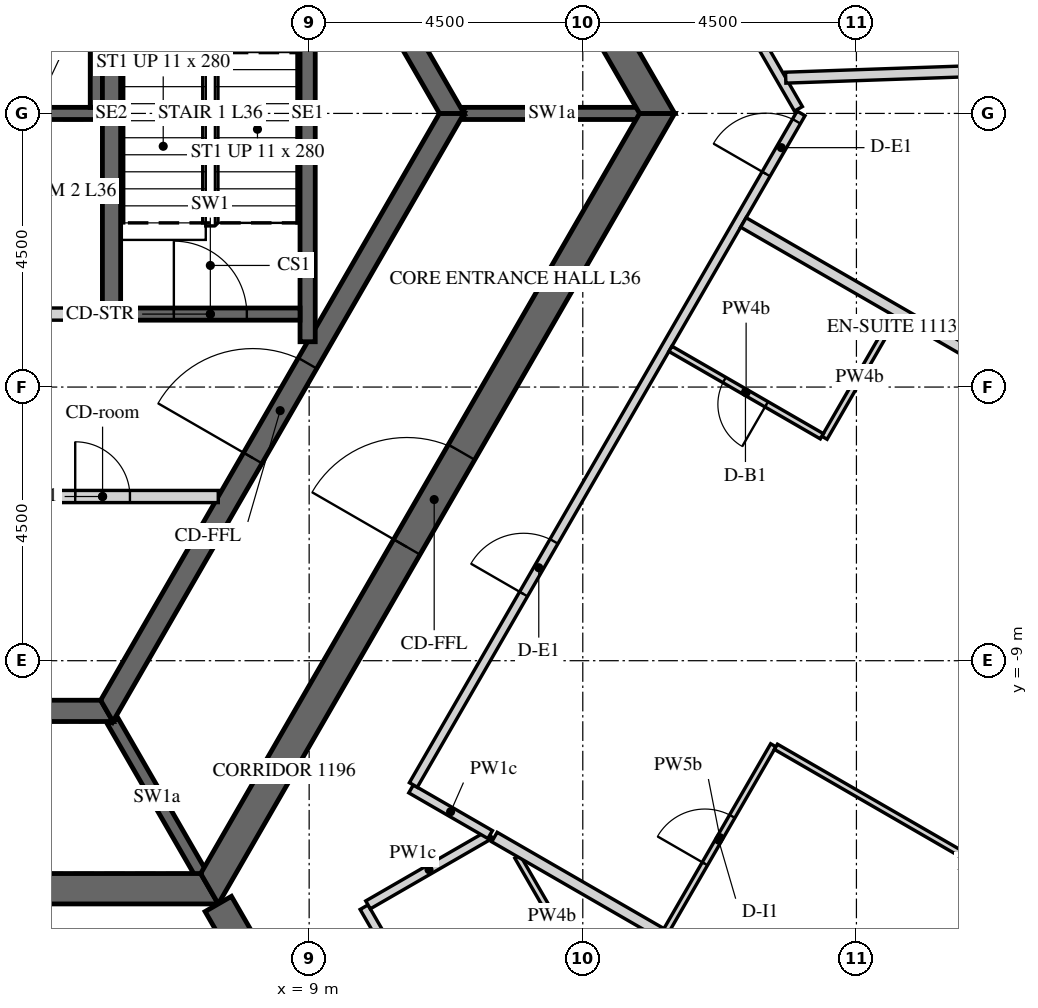
"""IFC4 building model, lengths in metres.
Left out: names, types, materials, properties, quantities, classifications, styles, units other than length and angle.
Written with IfcOpenShell. Run it as: python <this file> out.ifc"""

import sys

from ifc_helpers import new_model, si_unit, direction, frame, frame_2d, origin, place, context, subcontext, project, spatial, polyline, rectangle, outline, extrude, element, fill, save


model = new_model("IFC4")
c1 = context("Model", 3, precision=1e-05, world=origin(), true_north=direction((0.0, 1.0)))
c2 = subcontext(c1, "Body", "Model", "MODEL_VIEW")
j1 = project(units=[si_unit("LENGTHUNIT", "METRE"), si_unit("PLANEANGLEUNIT", "RADIAN")], contexts=[c1])
p1 = place(None, origin())
s1 = spatial("IfcSite", under=j1, at=p1, CompositionType="ELEMENT")
p2 = place(p1, origin())
s2 = spatial("IfcBuilding", under=s1, at=p2, CompositionType="ELEMENT")
p3 = place(p2, frame((0.0, 0.0, 156.6)))
s3 = spatial("IfcBuildingStorey", under=s2, at=p3, CompositionType="ELEMENT", Elevation=156.6)
p4 = place(p3, frame((17.63, -24.914, -0.15), z_axis=(0.0, 0.0, 1.0), x_axis=(0.499998569178, 0.866026229868, 0.0)))
e1 = element("IfcWall", 1, at=p4, inside=s3, PredefinedType="SOLIDWALL", context=c2, shape_type="SweptSolid", body=[
    extrude(outline(polyline([(-0.022, -0.275), (27.783, -0.275), (27.732, 0.275), (0.022, 0.275), (-0.022, -0.275)])), origin(), (0.0, 0.0, 1.0), 3.9),
])
p5 = place(p4, frame((1.879, 0.0, 1.05)))
e2 = element("IfcOpeningElement", 2, at=p5, cuts=e1, PredefinedType="OPENING", context=c2, shape_type="SweptSolid", body=[
    extrude(rectangle(XDim=2.4, YDim=2.4, at=frame_2d((1.2, 1.2))), frame((0.0, 0.285, 0.0), z_axis=(0.0, -1.0, 0.0), x_axis=(1.0, 0.0, 0.0)), (0.0, 0.0, 1.0), 0.57),
])
p6 = place(p4, frame((5.479, 0.0, 1.05)))
e3 = element("IfcOpeningElement", 3, at=p6, cuts=e1, PredefinedType="OPENING", context=c2, shape_type="SweptSolid", body=[
    extrude(rectangle(XDim=2.4, YDim=2.4, at=frame_2d((1.2, 1.2))), frame((0.0, 0.285, 0.0), z_axis=(0.0, -1.0, 0.0), x_axis=(1.0, 0.0, 0.0)), (0.0, 0.0, 1.0), 0.57),
])
p7 = place(p4, frame((9.079, 0.0, 1.05)))
e4 = element("IfcOpeningElement", 4, at=p7, cuts=e1, PredefinedType="OPENING", context=c2, shape_type="SweptSolid", body=[
    extrude(rectangle(XDim=2.4, YDim=2.4, at=frame_2d((1.2, 1.2))), frame((0.0, 0.285, 0.0), z_axis=(0.0, -1.0, 0.0), x_axis=(1.0, 0.0, 0.0)), (0.0, 0.0, 1.0), 0.57),
])
p8 = place(p4, frame((12.679, 0.0, 1.05)))
e5 = element("IfcOpeningElement", 5, at=p8, cuts=e1, PredefinedType="OPENING", context=c2, shape_type="SweptSolid", body=[
    extrude(rectangle(XDim=2.4, YDim=2.4, at=frame_2d((1.2, 1.2))), frame((0.0, 0.285, 0.0), z_axis=(0.0, -1.0, 0.0), x_axis=(1.0, 0.0, 0.0)), (0.0, 0.0, 1.0), 0.57),
])
p9 = place(p4, frame((16.279, 0.0, 1.05)))
e6 = element("IfcOpeningElement", 6, at=p9, cuts=e1, PredefinedType="OPENING", context=c2, shape_type="SweptSolid", body=[
    extrude(rectangle(XDim=2.4, YDim=2.4, at=frame_2d((1.2, 1.2))), frame((0.0, 0.285, 0.0), z_axis=(0.0, -1.0, 0.0), x_axis=(1.0, 0.0, 0.0)), (0.0, 0.0, 1.0), 0.57),
])
p10 = place(p4, frame((19.879, 0.0, 1.05)))
e7 = element("IfcOpeningElement", 7, at=p10, cuts=e1, PredefinedType="OPENING", context=c2, shape_type="SweptSolid", body=[
    extrude(rectangle(XDim=2.4, YDim=2.4, at=frame_2d((1.2, 1.2))), frame((0.0, 0.285, 0.0), z_axis=(0.0, -1.0, 0.0), x_axis=(1.0, 0.0, 0.0)), (0.0, 0.0, 1.0), 0.57),
])
p11 = place(p4, frame((23.479, 0.0, 1.05)))
e8 = element("IfcOpeningElement", 8, at=p11, cuts=e1, PredefinedType="OPENING", context=c2, shape_type="SweptSolid", body=[
    extrude(rectangle(XDim=2.4, YDim=2.4, at=frame_2d((1.2, 1.2))), frame((0.0, 0.285, 0.0), z_axis=(0.0, -1.0, 0.0), x_axis=(1.0, 0.0, 0.0)), (0.0, 0.0, 1.0), 0.57),
])
p12 = place(p3, frame((-7.361, -12.75, -0.15), z_axis=(0.0, 0.0, 1.0), x_axis=(1.0, 0.0, 0.0)))
e9 = element("IfcWall", 9, at=p12, inside=s3, PredefinedType="SHEAR", context=c2, shape_type="SweptSolid", body=[
    extrude(outline(polyline([(-0.144, -0.25), (14.866, -0.25), (14.578, 0.25), (0.144, 0.25), (-0.144, -0.25)])), origin(), (0.0, 0.0, 1.0), 3.9),
])
p13 = place(p12, frame((6.761, 0.0, 0.15)))
e10 = element("IfcOpeningElement", 10, at=p13, cuts=e9, PredefinedType="OPENING", context=c2, shape_type="SweptSolid", body=[
    extrude(rectangle(XDim=1.2, YDim=2.4, at=frame_2d((0.6, 1.2))), frame((0.0, 0.26, 0.0), z_axis=(0.0, -1.0, 0.0), x_axis=(1.0, 0.0, 0.0)), (0.0, 0.0, 1.0), 0.52),
])
p14 = place(p3, frame((7.361, -12.75, -0.15), z_axis=(0.0, 0.0, 1.0), x_axis=(0.50000571537, 0.866022103989, 0.0)))
e11 = element("IfcWall", 11, at=p14, inside=s3, PredefinedType="SHEAR", context=c2, shape_type="SweptSolid", body=[
    extrude(outline(polyline([(-0.144, -0.25), (14.867, -0.25), (14.578, 0.25), (0.144, 0.25), (-0.144, -0.25)])), origin(), (0.0, 0.0, 1.0), 3.9),
])
p15 = place(p14, frame((6.49, 0.0, 0.15)))
e12 = element("IfcOpeningElement", 12, at=p15, cuts=e11, PredefinedType="OPENING", context=c2, shape_type="SweptSolid", body=[
    extrude(rectangle(XDim=1.8, YDim=2.4, at=frame_2d((0.9, 1.2))), frame((0.0, 0.26, 0.0), z_axis=(0.0, -1.0, 0.0), x_axis=(1.0, 0.0, 0.0)), (0.0, 0.0, 1.0), 0.52),
])
p16 = place(p3, frame((14.722, 0.0, -0.15), z_axis=(0.0, 0.0, 1.0), x_axis=(-0.50000571537, 0.866022103989, 0.0)))
e13 = element("IfcWall", 13, at=p16, inside=s3, PredefinedType="SHEAR", context=c2, shape_type="SweptSolid", body=[
    extrude(outline(polyline([(-0.144, -0.25), (14.867, -0.25), (14.578, 0.25), (0.144, 0.25), (-0.144, -0.25)])), origin(), (0.0, 0.0, 1.0), 3.9),
])
p17 = place(p16, frame((6.432, 0.0, 0.15)))
e14 = element("IfcOpeningElement", 14, at=p17, cuts=e13, PredefinedType="OPENING", context=c2, shape_type="SweptSolid", body=[
    extrude(rectangle(XDim=1.8, YDim=2.4, at=frame_2d((0.9, 1.2))), frame((0.0, 0.26, 0.0), z_axis=(0.0, -1.0, 0.0), x_axis=(1.0, 0.0, 0.0)), (0.0, 0.0, 1.0), 0.52),
])
p18 = place(p3, frame((7.506, -13.0, -0.15), z_axis=(0.0, 0.0, 1.0), x_axis=(0.499988271576, -0.866032175087, 0.0)))
e15 = element("IfcWall", 15, at=p18, inside=s3, PredefinedType="SHEAR", context=c2, shape_type="SweptSolid", body=[
    extrude(rectangle(XDim=15.424, YDim=0.5, at=frame_2d((7.712, 0.0))), origin(), (0.0, 0.0, 1.0), 3.9),
])
p19 = place(p18, frame((6.812, 0.0, 0.15)))
e16 = element("IfcOpeningElement", 16, at=p19, cuts=e15, PredefinedType="OPENING", context=c2, shape_type="SweptSolid", body=[
    extrude(rectangle(XDim=1.8, YDim=2.4, at=frame_2d((0.9, 1.2))), frame((0.0, 0.26, 0.0), z_axis=(0.0, -1.0, 0.0), x_axis=(1.0, 0.0, 0.0)), (0.0, 0.0, 1.0), 0.52),
])
p20 = place(p3, frame((-5.673, -9.825, -0.15), z_axis=(0.0, 0.0, 1.0), x_axis=(1.0, 0.0, 0.0)))
e17 = element("IfcWall", 17, at=p20, inside=s3, PredefinedType="SHEAR", context=c2, shape_type="SweptSolid", body=[
    extrude(outline(polyline([(-0.101, -0.175), (11.446, -0.175), (11.244, 0.175), (0.101, 0.175), (-0.101, -0.175)])), origin(), (0.0, 0.0, 1.0), 3.9),
])
p21 = place(p3, frame((5.673, -9.825, -0.15), z_axis=(0.0, 0.0, 1.0), x_axis=(0.499995046907, 0.866028263435, 0.0)))
e18 = element("IfcWall", 18, at=p21, inside=s3, PredefinedType="SHEAR", context=c2, shape_type="SweptSolid", body=[
    extrude(outline(polyline([(-0.101, -0.175), (11.446, -0.175), (11.244, 0.175), (0.101, 0.175), (-0.101, -0.175)])), origin(), (0.0, 0.0, 1.0), 3.9),
])
p22 = place(p21, frame((4.801, 0.0, 0.15)))
e19 = element("IfcOpeningElement", 19, at=p22, cuts=e18, PredefinedType="OPENING", context=c2, shape_type="SweptSolid", body=[
    extrude(rectangle(XDim=1.8, YDim=2.4, at=frame_2d((0.9, 1.2))), frame((0.0, 0.185, 0.0), z_axis=(0.0, -1.0, 0.0), x_axis=(1.0, 0.0, 0.0)), (0.0, 0.0, 1.0), 0.37),
])
p23 = place(p3, frame((11.345, 0.0, -0.15), z_axis=(0.0, 0.0, 1.0), x_axis=(-0.499995046907, 0.866028263435, 0.0)))
e20 = element("IfcWall", 20, at=p23, inside=s3, PredefinedType="SHEAR", context=c2, shape_type="SweptSolid", body=[
    extrude(outline(polyline([(-0.101, -0.175), (11.446, -0.175), (11.244, 0.175), (0.101, 0.175), (-0.101, -0.175)])), origin(), (0.0, 0.0, 1.0), 3.9),
])
p24 = place(p23, frame((4.744, 0.0, 0.15)))
e21 = element("IfcOpeningElement", 21, at=p24, cuts=e20, PredefinedType="OPENING", context=c2, shape_type="SweptSolid", body=[
    extrude(rectangle(XDim=1.8, YDim=2.4, at=frame_2d((0.9, 1.2))), frame((0.0, 0.185, 0.0), z_axis=(0.0, -1.0, 0.0), x_axis=(1.0, 0.0, 0.0)), (0.0, 0.0, 1.0), 0.37),
])
p25 = place(p3, frame((-5.6, 0.0, -0.25), z_axis=(0.0, 0.0, 1.0), x_axis=(1.0, 0.0, 0.0)))
e22 = element("IfcWall", 22, at=p25, inside=s3, PredefinedType="SHEAR", context=c2, shape_type="SweptSolid", body=[
    extrude(rectangle(XDim=11.2, YDim=0.2, at=frame_2d((5.6, 0.0))), origin(), (0.0, 0.0, 1.0), 3.9),
])
p26 = place(p3, frame((5.5, 0.1, -0.25), z_axis=(0.0, 0.0, 1.0), x_axis=(0.0, 1.0, 0.0)))
e23 = element("IfcWall", 23, at=p26, inside=s3, PredefinedType="SHEAR", context=c2, shape_type="SweptSolid", body=[
    extrude(rectangle(XDim=3.1, YDim=0.2, at=frame_2d((1.55, 0.0))), origin(), (0.0, 0.0, 1.0), 3.9),
])
p27 = place(p3, frame((0.1, -3.3, 0.0), z_axis=(0.0, 0.0, 1.0), x_axis=(1.0, 0.0, 0.0)))
e24 = element("IfcWall", 24, at=p27, inside=s3, PredefinedType="PARTITIONING", context=c2, shape_type="SweptSolid", body=[
    extrude(rectangle(XDim=5.5, YDim=0.2, at=frame_2d((2.75, 0.0))), origin(), (0.0, 0.0, 1.0), 3.65),
])
p28 = place(p27, frame((2.3, 0.0, 0.0)))
e25 = element("IfcOpeningElement", 25, at=p28, cuts=e24, PredefinedType="OPENING", context=c2, shape_type="SweptSolid", body=[
    extrude(rectangle(XDim=0.9, YDim=2.1, at=frame_2d((0.45, 1.05))), frame((0.0, 0.11, 0.0), z_axis=(0.0, -1.0, 0.0), x_axis=(1.0, 0.0, 0.0)), (0.0, 0.0, 1.0), 0.22),
])
p29 = place(p3, frame((3.7, -6.3, 0.0), z_axis=(0.0, 0.0, 1.0), x_axis=(1.0, 0.0, 0.0)))
e26 = element("IfcWall", 26, at=p29, inside=s3, PredefinedType="PARTITIONING", context=c2, shape_type="SweptSolid", body=[
    extrude(rectangle(XDim=3.806, YDim=0.2, at=frame_2d((1.903, 0.0))), origin(), (0.0, 0.0, 1.0), 3.65),
])
p30 = place(p29, frame((1.453, 0.0, 0.0)))
e27 = element("IfcOpeningElement", 27, at=p30, cuts=e26, PredefinedType="OPENING", context=c2, shape_type="SweptSolid", body=[
    extrude(rectangle(XDim=0.9, YDim=2.1, at=frame_2d((0.45, 1.05))), frame((0.0, 0.11, 0.0), z_axis=(0.0, -1.0, 0.0), x_axis=(1.0, 0.0, 0.0)), (0.0, 0.0, 1.0), 0.22),
])
for number, where, z_axis, x_axis in (
    (28, (11.547, 0.0, -0.15), (0.0, 0.0, 1.0), (1.0, 0.0, 0.0)),
    (29, (5.773, -10.0, -0.15), (0.0, 0.0, 1.0), (0.5, -0.866, 0.0)),
):
    element("IfcWall", number, at=place(p3, frame(where, z_axis=z_axis, x_axis=x_axis)), inside=s3, PredefinedType="SHEAR", context=c2, shape_type="SweptSolid", body=[
        extrude(rectangle(XDim=2.887, YDim=0.2, at=frame_2d((1.443, 0.0))), origin(), (0.0, 0.0, 1.0), 3.9),
    ])
p31 = place(p3, frame((5.75, -3.4, -0.25), z_axis=(0.0, 0.0, 1.0), x_axis=(0.0, 1.0, 0.0)))
e30 = element("IfcWall", 30, at=p31, inside=s3, PredefinedType="SHEAR", context=c2, shape_type="SweptSolid", body=[
    extrude(rectangle(XDim=6.8, YDim=0.3, at=frame_2d((3.4, 0.0))), origin(), (0.0, 0.0, 1.0), 3.9),
])
p32 = place(p3, frame((8.975, -3.755, -0.25), z_axis=(0.0, 0.0, 1.0), x_axis=(0.0, 1.0, 0.0)))
e31 = element("IfcWall", 31, at=p32, inside=s3, PredefinedType="SHEAR", context=c2, shape_type="SweptSolid", body=[
    extrude(rectangle(XDim=7.51, YDim=0.25, at=frame_2d((3.755, 0.0))), origin(), (0.0, 0.0, 1.0), 3.9),
])
p33 = place(p3, frame((5.9, -3.3, -0.25), z_axis=(0.0, 0.0, 1.0), x_axis=(1.0, 0.0, 0.0)))
e32 = element("IfcWall", 32, at=p33, inside=s3, PredefinedType="SHEAR", context=c2, shape_type="SweptSolid", body=[
    extrude(rectangle(XDim=2.95, YDim=0.2, at=frame_2d((1.475, 0.0))), origin(), (0.0, 0.0, 1.0), 3.9),
])
p34 = place(p33, frame((0.875, 0.0, 0.25)))
e33 = element("IfcOpeningElement", 33, at=p34, cuts=e32, PredefinedType="OPENING", context=c2, shape_type="SweptSolid", body=[
    extrude(rectangle(XDim=1.2, YDim=2.4, at=frame_2d((0.6, 1.2))), frame((0.0, 0.11, 0.0), z_axis=(0.0, -1.0, 0.0), x_axis=(1.0, 0.0, 0.0)), (0.0, 0.0, 1.0), 0.22),
])
p35 = place(p3, frame((13.699, -19.628, 0.0), z_axis=(0.0, 0.0, 1.0), x_axis=(-0.499998968938, 0.866025999068, 0.0)))
e34 = element("IfcWall", 34, at=p35, inside=s3, PredefinedType="PARTITIONING", context=c2, shape_type="SweptSolid", body=[
    extrude(rectangle(XDim=7.592, YDim=0.15, at=frame_2d((3.796, 0.0))), origin(), (0.0, 0.0, 1.0), 2.823),
])
p36 = place(p35, frame((2.033, 0.0, 0.0)))
e35 = element("IfcOpeningElement", 35, at=p36, cuts=e34, PredefinedType="OPENING", context=c2, shape_type="SweptSolid", body=[
    extrude(rectangle(XDim=1.0, YDim=2.1, at=frame_2d((0.5, 1.05))), frame((0.0, 0.085, 0.0), z_axis=(0.0, -1.0, 0.0), x_axis=(1.0, 0.0, 0.0)), (0.0, 0.0, 1.0), 0.17),
])
p37 = place(p3, frame((9.968, -13.016, 0.0), z_axis=(0.0, 0.0, 1.0), x_axis=(0.866022320763, 0.500005339912, 0.0)))
e36 = element("IfcWall", 36, at=p37, inside=s3, PredefinedType="PARTITIONING", context=c2, shape_type="SweptSolid", body=[
    extrude(rectangle(XDim=2.316, YDim=0.15, at=frame_2d((1.158, 0.0))), origin(), (0.0, 0.0, 1.0), 2.823),
])
p38 = place(p3, frame((11.977, -11.859, 0.0), z_axis=(0.0, 0.0, 1.0), x_axis=(-0.865993364801, 0.500055489042, 0.0)))
e37 = element("IfcWall", 37, at=p38, inside=s3, PredefinedType="PARTITIONING", context=c2, shape_type="SweptSolid", body=[
    extrude(rectangle(XDim=1.502, YDim=0.15, at=frame_2d((0.751, 0.0))), origin(), (0.0, 0.0, 1.0), 2.823),
])
p39 = place(p3, frame((10.714, -11.043, 0.0), z_axis=(0.0, 0.0, 1.0), x_axis=(0.500001980452, 0.866024260367, 0.0)))
e38 = element("IfcWall", 38, at=p39, inside=s3, PredefinedType="PARTITIONING", context=c2, shape_type="SweptSolid", body=[
    extrude(rectangle(XDim=12.752, YDim=0.15, at=frame_2d((6.376, 0.0))), origin(), (0.0, 0.0, 1.0), 2.823),
])
p40 = place(p39, frame((3.625, 0.0, 0.0)))
e39 = element("IfcOpeningElement", 39, at=p40, cuts=e38, PredefinedType="OPENING", context=c2, shape_type="SweptSolid", body=[
    extrude(rectangle(XDim=1.0, YDim=2.1, at=frame_2d((0.5, 1.05))), frame((0.0, 0.085, 0.0), z_axis=(0.0, -1.0, 0.0), x_axis=(1.0, 0.0, 0.0)), (0.0, 0.0, 1.0), 0.17),
])
p41 = place(p39, frame((11.602, 0.0, 0.0)))
e40 = element("IfcOpeningElement", 40, at=p41, cuts=e38, PredefinedType="OPENING", context=c2, shape_type="SweptSolid", body=[
    extrude(rectangle(XDim=1.0, YDim=2.1, at=frame_2d((0.5, 1.05))), frame((0.0, 0.085, 0.0), z_axis=(0.0, -1.0, 0.0), x_axis=(1.0, 0.0, 0.0)), (0.0, 0.0, 1.0), 0.17),
])
p42 = place(p3, frame((17.046, 0.075, 0.0), z_axis=(0.0, 0.0, 1.0), x_axis=(-0.499999403554, 0.866025748143, 0.0)))
e41 = element("IfcWall", 41, at=p42, inside=s3, PredefinedType="PARTITIONING", context=c2, shape_type="SweptSolid", body=[
    extrude(rectangle(XDim=14.549, YDim=0.15, at=frame_2d((7.275, 0.0))), origin(), (0.0, 0.0, 1.0), 2.823),
])
p43 = place(p42, frame((1.781, 0.0, 0.0)))
e42 = element("IfcOpeningElement", 42, at=p43, cuts=e41, PredefinedType="OPENING", context=c2, shape_type="SweptSolid", body=[
    extrude(rectangle(XDim=1.0, YDim=2.1, at=frame_2d((0.5, 1.05))), frame((0.0, 0.085, 0.0), z_axis=(0.0, -1.0, 0.0), x_axis=(1.0, 0.0, 0.0)), (0.0, 0.0, 1.0), 0.17),
])
p44 = place(p42, frame((8.705, 0.0, 0.0)))
e43 = element("IfcOpeningElement", 43, at=p44, cuts=e41, PredefinedType="OPENING", context=c2, shape_type="SweptSolid", body=[
    extrude(rectangle(XDim=1.0, YDim=2.1, at=frame_2d((0.5, 1.05))), frame((0.0, 0.085, 0.0), z_axis=(0.0, -1.0, 0.0), x_axis=(1.0, 0.0, 0.0)), (0.0, 0.0, 1.0), 0.17),
])
p45 = place(p3, frame((12.426, -12.223, 0.0), z_axis=(0.0, 0.0, 1.0), x_axis=(0.499919032186, -0.866072145528, 0.0)))
e44 = element("IfcWall", 44, at=p45, inside=s3, PredefinedType="PARTITIONING", context=c2, shape_type="SweptSolid", body=[
    extrude(rectangle(XDim=2.258, YDim=0.1, at=frame_2d((1.129, 0.0))), origin(), (0.0, 0.0, 1.0), 2.823),
])
p46 = place(p3, frame((21.631, -17.433, 0.0), z_axis=(0.0, 0.0, 1.0), x_axis=(-0.866031296205, 0.499989793889, 0.0)))
e45 = element("IfcWall", 45, at=p46, inside=s3, PredefinedType="PARTITIONING", context=c2, shape_type="SweptSolid", body=[
    extrude(rectangle(XDim=11.067, YDim=0.18, at=frame_2d((5.534, 0.0))), origin(), (0.0, 0.0, 1.0), 2.823),
])
p47 = place(p3, frame((18.629, -3.333, 0.0), z_axis=(0.0, 0.0, 1.0), x_axis=(-0.500015210774, -0.866016621662, 0.0)))
e46 = element("IfcWall", 46, at=p47, inside=s3, PredefinedType="PARTITIONING", context=c2, shape_type="SweptSolid", body=[
    extrude(rectangle(XDim=2.31, YDim=0.1, at=frame_2d((1.155, 0.0))), origin(), (0.0, 0.0, 1.0), 2.823),
])
p48 = place(p3, frame((17.431, -5.309, 0.0), z_axis=(0.0, 0.0, 1.0), x_axis=(-0.866018712932, 0.500011588718, 0.0)))
e47 = element("IfcWall", 47, at=p48, inside=s3, PredefinedType="PARTITIONING", context=c2, shape_type="SweptSolid", body=[
    extrude(rectangle(XDim=2.875, YDim=0.1, at=frame_2d((1.438, 0.0))), origin(), (0.0, 0.0, 1.0), 2.823),
])
p49 = place(p48, frame((1.05, 0.0, 0.0)))
e48 = element("IfcOpeningElement", 48, at=p49, cuts=e47, PredefinedType="OPENING", context=c2, shape_type="SweptSolid", body=[
    extrude(rectangle(XDim=0.8, YDim=2.1, at=frame_2d((0.4, 1.05))), frame((0.0, 0.06, 0.0), z_axis=(0.0, -1.0, 0.0), x_axis=(1.0, 0.0, 0.0)), (0.0, 0.0, 1.0), 0.12),
])
p50 = place(p3, frame((14.878, -13.43, 0.0), z_axis=(0.0, 0.0, 1.0), x_axis=(0.500021481416, 0.866013001128, 0.0)))
e49 = element("IfcWall", 49, at=p50, inside=s3, PredefinedType="PARTITIONING", context=c2, shape_type="SweptSolid", body=[
    extrude(rectangle(XDim=3.51, YDim=0.1, at=frame_2d((1.755, 0.0))), origin(), (0.0, 0.0, 1.0), 2.823),
])
p51 = place(p50, frame((1.26, 0.0, 0.0)))
e50 = element("IfcOpeningElement", 50, at=p51, cuts=e49, PredefinedType="OPENING", context=c2, shape_type="SweptSolid", body=[
    extrude(rectangle(XDim=0.9, YDim=2.1, at=frame_2d((0.45, 1.05))), frame((0.0, 0.06, 0.0), z_axis=(0.0, -1.0, 0.0), x_axis=(1.0, 0.0, 0.0)), (0.0, 0.0, 1.0), 0.12),
])
p52 = place(p3, frame((16.676, -10.416, 0.0), z_axis=(0.0, 0.0, 1.0), x_axis=(0.866034953203, -0.499983459557, 0.0)))
e51 = element("IfcWall", 51, at=p52, inside=s3, PredefinedType="PARTITIONING", context=c2, shape_type="SweptSolid", body=[
    extrude(rectangle(XDim=7.8, YDim=0.1, at=frame_2d((3.9, 0.0))), origin(), (0.0, 0.0, 1.0), 2.823),
])
p53 = place(p3, frame((27.031, -8.08, 0.0), z_axis=(0.0, 0.0, 1.0), x_axis=(-0.86602780907, 0.499995833901, 0.0)))
e52 = element("IfcWall", 52, at=p53, inside=s3, PredefinedType="PARTITIONING", context=c2, shape_type="SweptSolid", body=[
    extrude(rectangle(XDim=12.575, YDim=0.18, at=frame_2d((6.287, 0.0))), origin(), (0.0, 0.0, 1.0), 2.823),
])
p54 = place(p3, frame((31.667, 1.106, 0.0), z_axis=(0.0, 0.0, 1.0), x_axis=(-0.999390937365, -0.034896336667, 0.0)))
e53 = element("IfcWall", 53, at=p54, inside=s3, PredefinedType="PARTITIONING", context=c2, shape_type="SweptSolid", body=[
    extrude(rectangle(XDim=14.839, YDim=0.18, at=frame_2d((7.419, 0.0))), origin(), (0.0, 0.0, 1.0), 2.823),
])
p55 = place(p15, origin())
e54 = element("IfcDoor", 54, at=p55, inside=s3, OperationType="DOUBLE_DOOR_SINGLE_SWING", PredefinedType="DOOR", context=c2, shape_type="SweptSolid", body=[
    extrude(rectangle(XDim=1.8, YDim=2.4, at=frame_2d((0.9, 1.2))), frame((0.0, 0.025, 0.0), z_axis=(0.0, -1.0, 0.0), x_axis=(1.0, 0.0, 0.0)), (0.0, 0.0, 1.0), 0.05),
])
fill(e12, e54)
p56 = place(p22, origin())
e55 = element("IfcDoor", 55, at=p56, inside=s3, OperationType="DOUBLE_DOOR_SINGLE_SWING", PredefinedType="DOOR", context=c2, shape_type="SweptSolid", body=[
    extrude(rectangle(XDim=1.8, YDim=2.4, at=frame_2d((0.9, 1.2))), frame((0.0, 0.025, 0.0), z_axis=(0.0, -1.0, 0.0), x_axis=(1.0, 0.0, 0.0)), (0.0, 0.0, 1.0), 0.05),
])
fill(e19, e55)
p57 = place(p30, origin())
e56 = element("IfcDoor", 56, at=p57, inside=s3, OperationType="SINGLE_SWING_LEFT", PredefinedType="DOOR", context=c2, shape_type="SweptSolid", body=[
    extrude(rectangle(XDim=0.9, YDim=2.1, at=frame_2d((0.45, 1.05))), frame((0.0, 0.025, 0.0), z_axis=(0.0, -1.0, 0.0), x_axis=(1.0, 0.0, 0.0)), (0.0, 0.0, 1.0), 0.05),
])
fill(e27, e56)
p58 = place(p34, origin())
e57 = element("IfcDoor", 57, at=p58, inside=s3, OperationType="SINGLE_SWING_LEFT", PredefinedType="DOOR", context=c2, shape_type="SweptSolid", body=[
    extrude(rectangle(XDim=1.2, YDim=2.4, at=frame_2d((0.6, 1.2))), frame((0.0, 0.025, 0.0), z_axis=(0.0, -1.0, 0.0), x_axis=(1.0, 0.0, 0.0)), (0.0, 0.0, 1.0), 0.05),
])
fill(e33, e57)
p59 = place(p40, origin())
e58 = element("IfcDoor", 58, at=p59, inside=s3, OperationType="SINGLE_SWING_RIGHT", PredefinedType="DOOR", context=c2, shape_type="SweptSolid", body=[
    extrude(rectangle(XDim=1.0, YDim=2.1, at=frame_2d((0.5, 1.05))), frame((0.0, 0.025, 0.0), z_axis=(0.0, -1.0, 0.0), x_axis=(1.0, 0.0, 0.0)), (0.0, 0.0, 1.0), 0.05),
])
fill(e39, e58)
p60 = place(p49, origin())
e59 = element("IfcDoor", 59, at=p60, inside=s3, OperationType="SINGLE_SWING_LEFT", PredefinedType="DOOR", context=c2, shape_type="SweptSolid", body=[
    extrude(rectangle(XDim=0.8, YDim=2.1, at=frame_2d((0.4, 1.05))), frame((0.0, 0.025, 0.0), z_axis=(0.0, -1.0, 0.0), x_axis=(1.0, 0.0, 0.0)), (0.0, 0.0, 1.0), 0.05),
])
fill(e48, e59)
p61 = place(p51, origin())
e60 = element("IfcDoor", 60, at=p61, inside=s3, OperationType="SINGLE_SWING_RIGHT", PredefinedType="DOOR", context=c2, shape_type="SweptSolid", body=[
    extrude(rectangle(XDim=0.9, YDim=2.1, at=frame_2d((0.45, 1.05))), frame((0.0, 0.025, 0.0), z_axis=(0.0, -1.0, 0.0), x_axis=(1.0, 0.0, 0.0)), (0.0, 0.0, 1.0), 0.05),
])
fill(e50, e60)
p62 = place(p41, origin())
e61 = element("IfcDoor", 61, at=p62, inside=s3, OperationType="SINGLE_SWING_LEFT", PredefinedType="DOOR", context=c2, shape_type="SweptSolid", body=[
    extrude(rectangle(XDim=1.0, YDim=2.1, at=frame_2d((0.5, 1.05))), frame((0.0, 0.025, 0.0), z_axis=(0.0, -1.0, 0.0), x_axis=(1.0, 0.0, 0.0)), (0.0, 0.0, 1.0), 0.05),
])
fill(e40, e61)
save(model, sys.argv[1])
